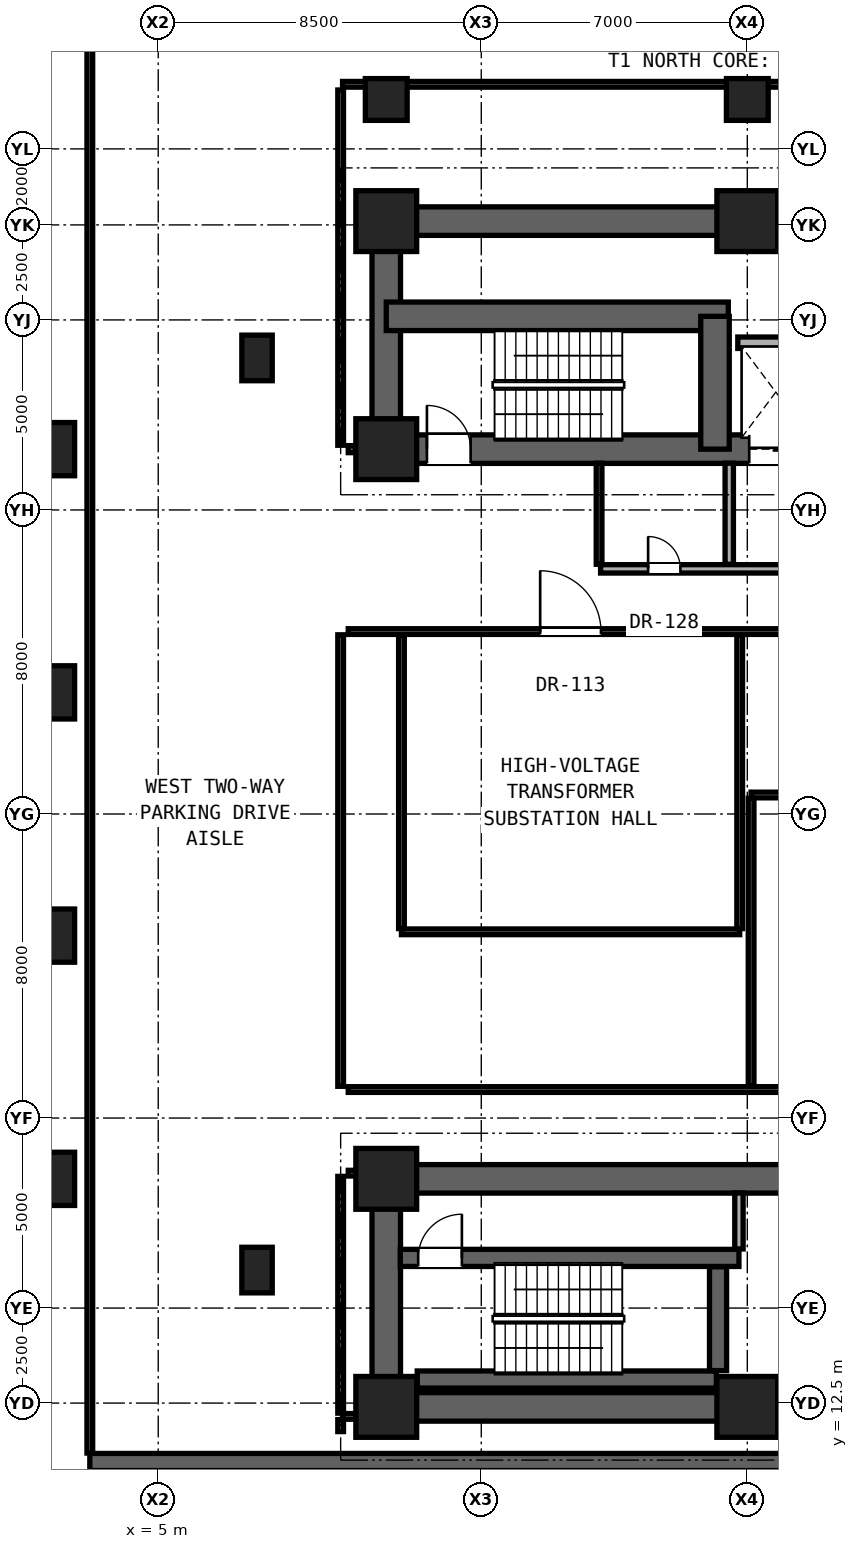
"""IFC4 building model, lengths in metres.
Left out: names, types, materials, properties, quantities, classifications, styles, units other than length and angle.
Written with IfcOpenShell. Run it as: python <this file> out.ifc"""

import sys

from ifc_helpers import new_model, si_unit, direction, frame, frame_2d, origin, origin_2d, place, context, subcontext, project, spatial, rectangle, hollow_rectangle, extrude, element, fill, save


model = new_model("IFC4")
c1 = context("Model", 3, precision=1e-05, world=origin(), true_north=direction((0.0, 1.0)))
c2 = subcontext(c1, "Body", "Model", "MODEL_VIEW")
j1 = project(units=[si_unit("LENGTHUNIT", "METRE"), si_unit("PLANEANGLEUNIT", "RADIAN")], contexts=[c1])
p1 = place(None, origin())
s1 = spatial("IfcSite", under=j1, at=p1, CompositionType="ELEMENT")
p2 = place(p1, origin())
s2 = spatial("IfcBuilding", under=s1, at=p2, CompositionType="ELEMENT")
p3 = place(p2, frame((0.0, 0.0, -4.8)))
s3 = spatial("IfcBuildingStorey", under=s2, at=p3, CompositionType="ELEMENT", Elevation=-4.8)
for number, where, z_axis, x_axis in (
    (1, (11.0, 12.4, 0.0), (0.0, 0.0, 1.0), (1.0, 0.0, 0.0)),
    (2, (20.5, 12.4, 0.0), (0.0, 0.0, 1.0), (1.0, 0.0, 0.0)),
    (3, (11.0, 18.4, 0.0), (0.0, 0.0, 1.0), (1.0, 0.0, 0.0)),
    (4, (11.0, 37.6, 0.0), (0.0, 0.0, 1.0), (1.0, 0.0, 0.0)),
    (5, (11.0, 43.6, 0.0), (0.0, 0.0, 1.0), (1.0, 0.0, 0.0)),
    (6, (20.5, 43.6, 0.0), (0.0, 0.0, 1.0), (1.0, 0.0, 0.0)),
):
    element("IfcColumn", number, at=place(p3, frame(where, z_axis=z_axis, x_axis=x_axis)), inside=s3, PredefinedType="COLUMN", context=c2, shape_type="SweptSolid", body=[
        extrude(rectangle(XDim=1.6, YDim=1.6, at=origin_2d()), origin(), (0.0, 0.0, 1.0), 4.8),
    ])
for number, where, z_axis, x_axis in (
    (7, (2.1, 18.4, 0.0), (0.0, 0.0, 1.0), (1.0, 0.0, 0.0)),
    (8, (2.1, 24.8, 0.0), (0.0, 0.0, 1.0), (1.0, 0.0, 0.0)),
    (9, (2.1, 31.2, 0.0), (0.0, 0.0, 1.0), (1.0, 0.0, 0.0)),
    (10, (2.1, 37.6, 0.0), (0.0, 0.0, 1.0), (1.0, 0.0, 0.0)),
):
    element("IfcColumn", number, at=place(p3, frame(where, z_axis=z_axis, x_axis=x_axis)), inside=s3, PredefinedType="COLUMN", context=c2, shape_type="SweptSolid", body=[
        extrude(hollow_rectangle(XDim=1.4, YDim=1.4, WallThickness=0.08, at=origin_2d()), origin(), (0.0, 0.0, 1.0), 4.8),
    ])
for number, where, z_axis, x_axis in (
    (11, (7.6, 16.0, 0.0), (0.0, 0.0, 1.0), (1.0, 0.0, 0.0)),
    (12, (7.6, 40.0, 0.0), (0.0, 0.0, 1.0), (1.0, 0.0, 0.0)),
):
    element("IfcColumn", number, at=place(p3, frame(where, z_axis=z_axis, x_axis=x_axis)), inside=s3, PredefinedType="PILASTER", context=c2, shape_type="SweptSolid", body=[
        extrude(rectangle(XDim=0.8, YDim=1.2, at=origin_2d()), origin(), (0.0, 0.0, 1.0), 4.8),
    ])
p4 = place(p3, frame((11.0, 43.6, 0.0), z_axis=(0.0, 0.0, 1.0), x_axis=(1.0, 0.0, 0.0)))
e13 = element("IfcWall", 13, at=p4, inside=s3, PredefinedType="SHEAR", context=c2, shape_type="SweptSolid", body=[
    extrude(rectangle(XDim=19.0, YDim=0.75, at=frame_2d((9.5, 0.0))), origin(), (0.0, 0.0, 1.0), 4.48),
])
p5 = place(p3, frame((11.0, 37.6, 0.0), z_axis=(0.0, 0.0, 1.0), x_axis=(0.0, 1.0, 0.0)))
e14 = element("IfcWall", 14, at=p5, inside=s3, PredefinedType="SHEAR", context=c2, shape_type="SweptSolid", body=[
    extrude(rectangle(XDim=6.0, YDim=0.75, at=frame_2d((3.0, 0.0))), origin(), (0.0, 0.0, 1.0), 4.48),
])
p6 = place(p3, frame((11.0, 37.6, 0.0), z_axis=(0.0, 0.0, 1.0), x_axis=(1.0, 0.0, 0.0)))
e15 = element("IfcWall", 15, at=p6, inside=s3, PredefinedType="SHEAR", context=c2, shape_type="SweptSolid", body=[
    extrude(rectangle(XDim=19.0, YDim=0.75, at=frame_2d((9.5, 0.0))), origin(), (0.0, 0.0, 1.0), 4.48),
])
p7 = place(p6, frame((1.07, 0.0, 0.0)))
e16 = element("IfcOpeningElement", 16, at=p7, cuts=e15, PredefinedType="OPENING", context=c2, shape_type="SweptSolid", body=[
    extrude(rectangle(XDim=1.15, YDim=2.2, at=frame_2d((0.575, 1.1))), frame((0.0, 0.385, 0.0), z_axis=(0.0, -1.0, 0.0), x_axis=(1.0, 0.0, 0.0)), (0.0, 0.0, 1.0), 0.77),
])
p8 = place(p6, frame((9.55, 0.0, 0.0)))
e17 = element("IfcOpeningElement", 17, at=p8, cuts=e15, PredefinedType="OPENING", context=c2, shape_type="SweptSolid", body=[
    extrude(rectangle(XDim=1.4, YDim=2.35, at=frame_2d((0.7, 1.175))), frame((0.0, 0.385, 0.0), z_axis=(0.0, -1.0, 0.0), x_axis=(1.0, 0.0, 0.0)), (0.0, 0.0, 1.0), 0.77),
])
p9 = place(p6, frame((11.95, 0.0, 0.0)))
e18 = element("IfcOpeningElement", 18, at=p9, cuts=e15, PredefinedType="OPENING", context=c2, shape_type="SweptSolid", body=[
    extrude(rectangle(XDim=1.4, YDim=2.35, at=frame_2d((0.7, 1.175))), frame((0.0, 0.385, 0.0), z_axis=(0.0, -1.0, 0.0), x_axis=(1.0, 0.0, 0.0)), (0.0, 0.0, 1.0), 0.77),
])
p10 = place(p3, frame((11.0, 41.095, 0.0), z_axis=(0.0, 0.0, 1.0), x_axis=(1.0, 0.0, 0.0)))
e19 = element("IfcWall", 19, at=p10, inside=s3, PredefinedType="SHEAR", context=c2, shape_type="SweptSolid", body=[
    extrude(rectangle(XDim=9.0, YDim=0.75, at=frame_2d((4.5, 0.0))), origin(), (0.0, 0.0, 1.0), 4.48),
])
p11 = place(p3, frame((19.65, 37.6, 0.0), z_axis=(0.0, 0.0, 1.0), x_axis=(0.0, 1.0, 0.0)))
e20 = element("IfcWall", 20, at=p11, inside=s3, PredefinedType="SHEAR", context=c2, shape_type="SweptSolid", body=[
    extrude(rectangle(XDim=3.495, YDim=0.75, at=frame_2d((1.748, 0.0))), origin(), (0.0, 0.0, 1.0), 4.48),
])
p12 = place(p3, frame((11.0, 12.4, 0.0), z_axis=(0.0, 0.0, 1.0), x_axis=(1.0, 0.0, 0.0)))
e21 = element("IfcWall", 21, at=p12, inside=s3, PredefinedType="SHEAR", context=c2, shape_type="SweptSolid", body=[
    extrude(rectangle(XDim=19.0, YDim=0.75, at=frame_2d((9.5, 0.0))), origin(), (0.0, 0.0, 1.0), 4.48),
])
p13 = place(p3, frame((11.0, 12.4, 0.0), z_axis=(0.0, 0.0, 1.0), x_axis=(0.0, 1.0, 0.0)))
e22 = element("IfcWall", 22, at=p13, inside=s3, PredefinedType="SHEAR", context=c2, shape_type="SweptSolid", body=[
    extrude(rectangle(XDim=6.0, YDim=0.75, at=frame_2d((3.0, 0.0))), origin(), (0.0, 0.0, 1.0), 4.48),
])
p14 = place(p3, frame((11.0, 18.4, 0.0), z_axis=(0.0, 0.0, 1.0), x_axis=(1.0, 0.0, 0.0)))
e23 = element("IfcWall", 23, at=p14, inside=s3, PredefinedType="SHEAR", context=c2, shape_type="SweptSolid", body=[
    extrude(rectangle(XDim=19.0, YDim=0.75, at=frame_2d((9.5, 0.0))), origin(), (0.0, 0.0, 1.0), 4.48),
])
for number, where, z_axis, x_axis in (
    (24, (11.0, 46.8, 0.0), (0.0, 0.0, 1.0), (1.0, 0.0, 0.0)),
    (25, (20.5, 46.8, 0.0), (0.0, 0.0, 1.0), (1.0, 0.0, 0.0)),
):
    element("IfcColumn", number, at=place(p3, frame(where, z_axis=z_axis, x_axis=x_axis)), inside=s3, PredefinedType="COLUMN", context=c2, shape_type="SweptSolid", body=[
        extrude(rectangle(XDim=1.1, YDim=1.1, at=origin_2d()), origin(), (0.0, 0.0, 1.0), 4.8),
    ])
p15 = place(p3, frame((3.2, 10.95, 0.0), z_axis=(0.0, 0.0, 1.0), x_axis=(1.0, 0.0, 0.0)))
e26 = element("IfcWall", 26, at=p15, inside=s3, PredefinedType="SHEAR", context=c2, shape_type="SweptSolid", body=[
    extrude(rectangle(XDim=90.8, YDim=0.45, at=frame_2d((45.4, 0.0))), origin(), (0.0, 0.0, 1.0), 4.48),
])
p16 = place(p15, frame((18.57, 0.0, 0.0)))
e27 = element("IfcOpeningElement", 27, at=p16, cuts=e26, PredefinedType="OPENING", context=c2, shape_type="SweptSolid", body=[
    extrude(rectangle(XDim=1.15, YDim=2.2, at=frame_2d((0.575, 1.1))), frame((0.0, 0.235, 0.0), z_axis=(0.0, -1.0, 0.0), x_axis=(1.0, 0.0, 0.0)), (0.0, 0.0, 1.0), 0.47),
])
p17 = place(p15, frame((66.17, 0.0, 0.0)))
e28 = element("IfcOpeningElement", 28, at=p17, cuts=e26, PredefinedType="OPENING", context=c2, shape_type="SweptSolid", body=[
    extrude(rectangle(XDim=1.15, YDim=2.2, at=frame_2d((0.575, 1.1))), frame((0.0, 0.235, 0.0), z_axis=(0.0, -1.0, 0.0), x_axis=(1.0, 0.0, 0.0)), (0.0, 0.0, 1.0), 0.47),
])
p18 = place(p15, frame((31.0, 0.0, 0.0)))
e29 = element("IfcOpeningElement", 29, at=p18, cuts=e26, PredefinedType="OPENING", context=c2, shape_type="SweptSolid", body=[
    extrude(rectangle(XDim=1.2, YDim=2.25, at=frame_2d((0.6, 1.125))), frame((0.0, 0.235, 0.0), z_axis=(0.0, -1.0, 0.0), x_axis=(1.0, 0.0, 0.0)), (0.0, 0.0, 1.0), 0.47),
])
p19 = place(p15, frame((52.45, 0.0, 0.0)))
e30 = element("IfcOpeningElement", 30, at=p19, cuts=e26, PredefinedType="OPENING", context=c2, shape_type="SweptSolid", body=[
    extrude(rectangle(XDim=1.2, YDim=2.25, at=frame_2d((0.6, 1.125))), frame((0.0, 0.235, 0.0), z_axis=(0.0, -1.0, 0.0), x_axis=(1.0, 0.0, 0.0)), (0.0, 0.0, 1.0), 0.47),
])
p20 = place(p3, frame((9.85, 12.15, 0.0), z_axis=(0.0, 0.0, 1.0), x_axis=(1.0, 0.0, 0.0)))
e31 = element("IfcWall", 31, at=p20, inside=s3, PredefinedType="PARTITIONING", context=c2, shape_type="SweptSolid", body=[
    extrude(rectangle(XDim=1.13, YDim=0.15, at=frame_2d((0.565, 0.0))), origin(), (0.0, 0.0, 1.0), 3.519),
])
p21 = place(p3, frame((11.815, 13.12, 0.0), z_axis=(0.0, 0.0, 1.0), x_axis=(1.0, 0.0, 0.0)))
e32 = element("IfcWall", 32, at=p21, inside=s3, PredefinedType="SHEAR", context=c2, shape_type="SweptSolid", body=[
    extrude(rectangle(XDim=7.87, YDim=0.45, at=frame_2d((3.935, 0.0))), origin(), (0.0, 0.0, 1.0), 4.48),
])
p22 = place(p3, frame((11.37, 16.32, 0.0), z_axis=(0.0, 0.0, 1.0), x_axis=(1.0, 0.0, 0.0)))
e33 = element("IfcWall", 33, at=p22, inside=s3, PredefinedType="SHEAR", context=c2, shape_type="SweptSolid", body=[
    extrude(rectangle(XDim=8.91, YDim=0.45, at=frame_2d((4.455, 0.0))), origin(), (0.0, 0.0, 1.0), 4.48),
])
p23 = place(p22, frame((0.47, 0.0, 0.0)))
e34 = element("IfcOpeningElement", 34, at=p23, cuts=e33, PredefinedType="OPENING", context=c2, shape_type="SweptSolid", body=[
    extrude(rectangle(XDim=1.15, YDim=2.2, at=frame_2d((0.575, 1.1))), frame((0.0, 0.235, 0.0), z_axis=(0.0, -1.0, 0.0), x_axis=(1.0, 0.0, 0.0)), (0.0, 0.0, 1.0), 0.47),
])
p24 = place(p3, frame((10.0, 18.55, 0.0), z_axis=(0.0, 0.0, 1.0), x_axis=(1.0, 0.0, 0.0)))
e35 = element("IfcWall", 35, at=p24, inside=s3, PredefinedType="PARTITIONING", context=c2, shape_type="SweptSolid", body=[
    extrude(rectangle(XDim=0.98, YDim=0.15, at=frame_2d((0.49, 0.0))), origin(), (0.0, 0.0, 1.0), 3.372),
])
p25 = place(p3, frame((10.0, 20.75, 0.0), z_axis=(0.0, 0.0, 1.0), x_axis=(1.0, 0.0, 0.0)))
e36 = element("IfcWall", 36, at=p25, inside=s3, PredefinedType="PARTITIONING", context=c2, shape_type="SweptSolid", body=[
    extrude(rectangle(XDim=33.2, YDim=0.15, at=frame_2d((16.6, 0.0))), origin(), (0.0, 0.0, 1.0), 3.252),
])
p26 = place(p25, frame((14.4, 0.0, 0.0)))
e37 = element("IfcOpeningElement", 37, at=p26, cuts=e36, PredefinedType="OPENING", context=c2, shape_type="SweptSolid", body=[
    extrude(rectangle(XDim=1.6, YDim=2.3, at=frame_2d((0.8, 1.15))), frame((0.0, 0.085, 0.0), z_axis=(0.0, -1.0, 0.0), x_axis=(1.0, 0.0, 0.0)), (0.0, 0.0, 1.0), 0.17),
])
p27 = place(p3, frame((11.4, 24.9, 0.0), z_axis=(0.0, 0.0, 1.0), x_axis=(1.0, 0.0, 0.0)))
e38 = element("IfcWall", 38, at=p27, inside=s3, PredefinedType="PARTITIONING", context=c2, shape_type="SweptSolid", body=[
    extrude(rectangle(XDim=8.9, YDim=0.15, at=frame_2d((4.45, 0.0))), origin(), (0.0, 0.0, 1.0), 3.432),
])
p28 = place(p3, frame((20.6, 28.5, 0.0), z_axis=(0.0, 0.0, 1.0), x_axis=(1.0, 0.0, 0.0)))
e39 = element("IfcWall", 39, at=p28, inside=s3, PredefinedType="PARTITIONING", context=c2, shape_type="SweptSolid", body=[
    extrude(rectangle(XDim=9.2, YDim=0.15, at=frame_2d((4.6, 0.0))), origin(), (0.0, 0.0, 1.0), 3.432),
])
p29 = place(p3, frame((10.0, 32.8, 0.0), z_axis=(0.0, 0.0, 1.0), x_axis=(1.0, 0.0, 0.0)))
e40 = element("IfcWall", 40, at=p29, inside=s3, PredefinedType="PARTITIONING", context=c2, shape_type="SweptSolid", body=[
    extrude(rectangle(XDim=14.8, YDim=0.15, at=frame_2d((7.4, 0.0))), origin(), (0.0, 0.0, 1.0), 3.432),
])
p30 = place(p29, frame((5.05, 0.0, 0.0)))
e41 = element("IfcOpeningElement", 41, at=p30, cuts=e40, PredefinedType="OPENING", context=c2, shape_type="SweptSolid", body=[
    extrude(rectangle(XDim=1.6, YDim=2.3, at=frame_2d((0.8, 1.15))), frame((0.0, 0.085, 0.0), z_axis=(0.0, -1.0, 0.0), x_axis=(1.0, 0.0, 0.0)), (0.0, 0.0, 1.0), 0.17),
])
p31 = place(p3, frame((16.64, 34.45, 0.0), z_axis=(0.0, 0.0, 1.0), x_axis=(1.0, 0.0, 0.0)))
e42 = element("IfcWall", 42, at=p31, inside=s3, PredefinedType="SOLIDWALL", context=c2, shape_type="SweptSolid", body=[
    extrude(rectangle(XDim=8.16, YDim=0.22, at=frame_2d((4.08, 0.0))), origin(), (0.0, 0.0, 1.0), 4.009),
])
p32 = place(p31, frame((5.19, 0.0, 0.0)))
e43 = element("IfcOpeningElement", 43, at=p32, cuts=e42, PredefinedType="OPENING", context=c2, shape_type="SweptSolid", body=[
    extrude(rectangle(XDim=1.2, YDim=2.25, at=frame_2d((0.6, 1.125))), frame((0.0, 0.12, 0.0), z_axis=(0.0, -1.0, 0.0), x_axis=(1.0, 0.0, 0.0)), (0.0, 0.0, 1.0), 0.24),
])
p33 = place(p31, frame((1.25, 0.0, 0.0)))
e44 = element("IfcOpeningElement", 44, at=p33, cuts=e42, PredefinedType="OPENING", context=c2, shape_type="SweptSolid", body=[
    extrude(rectangle(XDim=0.85, YDim=2.01, at=frame_2d((0.425, 1.005))), frame((0.0, 0.12, 0.0), z_axis=(0.0, -1.0, 0.0), x_axis=(1.0, 0.0, 0.0)), (0.0, 0.0, 1.0), 0.24),
])
p34 = place(p3, frame((10.0, 37.6, 0.0), z_axis=(0.0, 0.0, 1.0), x_axis=(1.0, 0.0, 0.0)))
e45 = element("IfcWall", 45, at=p34, inside=s3, PredefinedType="SHEAR", context=c2, shape_type="SweptSolid", body=[
    extrude(rectangle(XDim=0.185, YDim=0.185, at=frame_2d((0.093, 0.0))), origin(), (0.0, 0.0, 1.0), 4.48),
])
p35 = place(p3, frame((20.25, 40.4, 0.0), z_axis=(0.0, 0.0, 1.0), x_axis=(1.0, 0.0, 0.0)))
e46 = element("IfcWall", 46, at=p35, inside=s3, PredefinedType="SOLIDWALL", context=c2, shape_type="SweptSolid", body=[
    extrude(rectangle(XDim=4.4, YDim=0.3, at=frame_2d((2.2, 0.0))), origin(), (0.0, 0.0, 1.0), 4.3),
])
p36 = place(p3, frame((9.85, 47.2, 0.0), z_axis=(0.0, 0.0, 1.0), x_axis=(1.0, 0.0, 0.0)))
e47 = element("IfcWall", 47, at=p36, inside=s3, PredefinedType="PARTITIONING", context=c2, shape_type="SweptSolid", body=[
    extrude(rectangle(XDim=33.3, YDim=0.15, at=frame_2d((16.65, 0.0))), origin(), (0.0, 0.0, 1.0), 4.3),
])
p37 = place(p3, frame((3.2, 11.185, 0.0), z_axis=(0.0, 0.0, 1.0), x_axis=(0.0, 1.0, 0.0)))
e48 = element("IfcWall", 48, at=p37, inside=s3, PredefinedType="PARTITIONING", context=c2, shape_type="SweptSolid", body=[
    extrude(rectangle(XDim=42.43, YDim=0.15, at=frame_2d((21.215, 0.0))), origin(), (0.0, 0.0, 1.0), 3.372),
])
p38 = place(p3, frame((9.8, 11.75, 0.0), z_axis=(0.0, 0.0, 1.0), x_axis=(0.0, 1.0, 0.0)))
e49 = element("IfcWall", 49, at=p38, inside=s3, PredefinedType="PARTITIONING", context=c2, shape_type="SweptSolid", body=[
    extrude(rectangle(XDim=0.315, YDim=0.15, at=frame_2d((0.157, 0.0))), origin(), (0.0, 0.0, 1.0), 4.3),
])
p39 = place(p3, frame((9.8, 12.235, 0.0), z_axis=(0.0, 0.0, 1.0), x_axis=(0.0, 1.0, 0.0)))
e50 = element("IfcWall", 50, at=p39, inside=s3, PredefinedType="PARTITIONING", context=c2, shape_type="SweptSolid", body=[
    extrude(rectangle(XDim=6.23, YDim=0.15, at=frame_2d((3.115, 0.0))), origin(), (0.0, 0.0, 1.0), 3.372),
])
p40 = place(p3, frame((9.8, 20.835, 0.0), z_axis=(0.0, 0.0, 1.0), x_axis=(0.0, 1.0, 0.0)))
e51 = element("IfcWall", 51, at=p40, inside=s3, PredefinedType="PARTITIONING", context=c2, shape_type="SweptSolid", body=[
    extrude(rectangle(XDim=11.88, YDim=0.15, at=frame_2d((5.94, 0.0))), origin(), (0.0, 0.0, 1.0), 3.699),
])
p41 = place(p3, frame((9.8, 37.702, 0.0), z_axis=(0.0, 0.0, 1.0), x_axis=(0.0, 1.0, 0.0)))
e52 = element("IfcWall", 52, at=p41, inside=s3, PredefinedType="PARTITIONING", context=c2, shape_type="SweptSolid", body=[
    extrude(rectangle(XDim=9.348, YDim=0.15, at=frame_2d((4.674, 0.0))), origin(), (0.0, 0.0, 1.0), 3.372),
])
p42 = place(p3, frame((11.4, 24.985, 0.0), z_axis=(0.0, 0.0, 1.0), x_axis=(0.0, 1.0, 0.0)))
e53 = element("IfcWall", 53, at=p42, inside=s3, PredefinedType="PARTITIONING", context=c2, shape_type="SweptSolid", body=[
    extrude(rectangle(XDim=7.73, YDim=0.15, at=frame_2d((3.865, 0.0))), origin(), (0.0, 0.0, 1.0), 3.432),
])
p43 = place(p3, frame((16.6, 34.57, 0.0), z_axis=(0.0, 0.0, 1.0), x_axis=(0.0, 1.0, 0.0)))
e54 = element("IfcWall", 54, at=p43, inside=s3, PredefinedType="PARTITIONING", context=c2, shape_type="SweptSolid", body=[
    extrude(rectangle(XDim=2.66, YDim=0.15, at=frame_2d((1.33, 0.0))), origin(), (0.0, 0.0, 1.0), 4.3),
])
p44 = place(p3, frame((19.73, 13.355, 0.0), z_axis=(0.0, 0.0, 1.0), x_axis=(0.0, 1.0, 0.0)))
e55 = element("IfcWall", 55, at=p44, inside=s3, PredefinedType="SHEAR", context=c2, shape_type="SweptSolid", body=[
    extrude(rectangle(XDim=2.73, YDim=0.45, at=frame_2d((1.365, 0.0))), origin(), (0.0, 0.0, 1.0), 4.48),
])
p45 = place(p3, frame((20.025, 34.57, 0.0), z_axis=(0.0, 0.0, 1.0), x_axis=(0.0, 1.0, 0.0)))
e56 = element("IfcWall", 56, at=p45, inside=s3, PredefinedType="SOLIDWALL", context=c2, shape_type="SweptSolid", body=[
    extrude(rectangle(XDim=2.66, YDim=0.22, at=frame_2d((1.33, 0.0))), origin(), (0.0, 0.0, 1.0), 4.3),
])
p46 = place(p3, frame((20.28, 16.555, 0.0), z_axis=(0.0, 0.0, 1.0), x_axis=(0.0, 1.0, 0.0)))
e57 = element("IfcWall", 57, at=p46, inside=s3, PredefinedType="SOLIDWALL", context=c2, shape_type="SweptSolid", body=[
    extrude(rectangle(XDim=1.475, YDim=0.22, at=frame_2d((0.738, 0.0))), origin(), (0.0, 0.0, 1.0), 4.3),
])
p47 = place(p3, frame((20.3, 24.985, 0.0), z_axis=(0.0, 0.0, 1.0), x_axis=(0.0, 1.0, 0.0)))
e58 = element("IfcWall", 58, at=p47, inside=s3, PredefinedType="PARTITIONING", context=c2, shape_type="SweptSolid", body=[
    extrude(rectangle(XDim=7.73, YDim=0.15, at=frame_2d((3.865, 0.0))), origin(), (0.0, 0.0, 1.0), 3.432),
])
p48 = place(p3, frame((20.6, 20.85, 0.0), z_axis=(0.0, 0.0, 1.0), x_axis=(0.0, 1.0, 0.0)))
e59 = element("IfcWall", 59, at=p48, inside=s3, PredefinedType="PARTITIONING", context=c2, shape_type="SweptSolid", body=[
    extrude(rectangle(XDim=7.565, YDim=0.15, at=frame_2d((3.782, 0.0))), origin(), (0.0, 0.0, 1.0), 3.432),
])
p49 = place(p7, origin())
e60 = element("IfcDoor", 60, at=p49, inside=s3, OperationType="SINGLE_SWING_LEFT", PredefinedType="DOOR", context=c2, shape_type="SweptSolid", body=[
    extrude(rectangle(XDim=1.15, YDim=2.2, at=frame_2d((0.575, 1.1))), frame((0.0, 0.025, 0.0), z_axis=(0.0, -1.0, 0.0), x_axis=(1.0, 0.0, 0.0)), (0.0, 0.0, 1.0), 0.05),
])
fill(e16, e60)
p50 = place(p33, origin())
e61 = element("IfcDoor", 61, at=p50, inside=s3, OperationType="SINGLE_SWING_LEFT", PredefinedType="DOOR", context=c2, shape_type="SweptSolid", body=[
    extrude(rectangle(XDim=0.85, YDim=2.01, at=frame_2d((0.425, 1.005))), frame((0.0, 0.025, 0.0), z_axis=(0.0, -1.0, 0.0), x_axis=(1.0, 0.0, 0.0)), (0.0, 0.0, 1.0), 0.05),
])
fill(e44, e61)
p51 = place(p23, origin())
e62 = element("IfcDoor", 62, at=p51, inside=s3, OperationType="SINGLE_SWING_RIGHT", PredefinedType="DOOR", context=c2, shape_type="SweptSolid", body=[
    extrude(rectangle(XDim=1.15, YDim=2.2, at=frame_2d((0.575, 1.1))), frame((0.0, 0.025, 0.0), z_axis=(0.0, -1.0, 0.0), x_axis=(1.0, 0.0, 0.0)), (0.0, 0.0, 1.0), 0.05),
])
fill(e34, e62)
p52 = place(p30, origin())
e63 = element("IfcDoor", 63, at=p52, inside=s3, OperationType="SINGLE_SWING_LEFT", PredefinedType="DOOR", context=c2, shape_type="SweptSolid", body=[
    extrude(rectangle(XDim=1.6, YDim=2.3, at=frame_2d((0.8, 1.15))), frame((0.0, 0.025, 0.0), z_axis=(0.0, -1.0, 0.0), x_axis=(1.0, 0.0, 0.0)), (0.0, 0.0, 1.0), 0.05),
])
fill(e41, e63)
p53 = place(p8, origin())
e64 = element("IfcDoor", 64, at=p53, inside=s3, OperationType="DOUBLE_DOOR_SLIDING", PredefinedType="DOOR", context=c2, shape_type="SweptSolid", body=[
    extrude(rectangle(XDim=1.4, YDim=2.35, at=frame_2d((0.7, 1.175))), frame((0.0, 0.025, 0.0), z_axis=(0.0, -1.0, 0.0), x_axis=(1.0, 0.0, 0.0)), (0.0, 0.0, 1.0), 0.05),
])
fill(e17, e64)
save(model, sys.argv[1])
